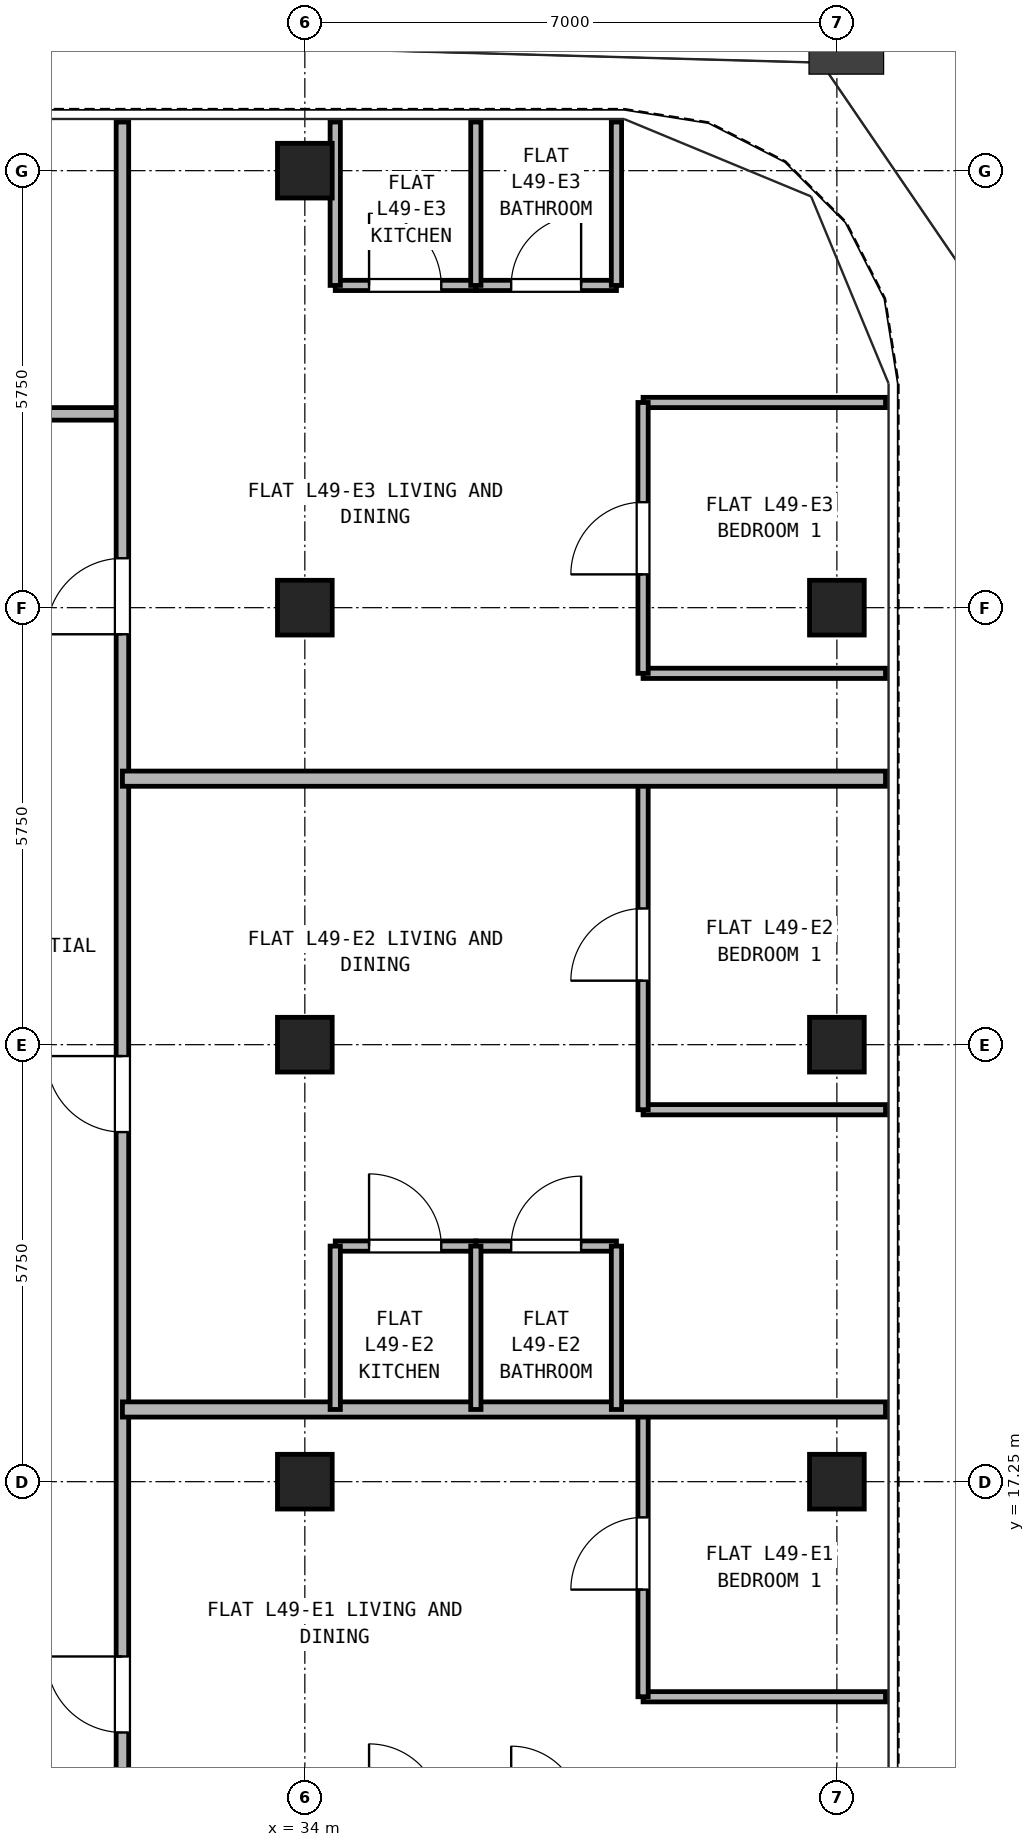
"""IFC4 building model, lengths in metres.
Left out: names, types, materials, properties, quantities, classifications, styles, units other than length and angle.
Written with IfcOpenShell. Run it as: python <this file> out.ifc"""

import sys

from ifc_helpers import new_model, si_unit, direction, frame, frame_2d, origin, origin_2d, place, context, subcontext, project, spatial, rectangle, hollow_rectangle, extrude, source, transform, mapped, element, fill, save


model = new_model("IFC4")
c1 = context("Model", 3, precision=1e-05, world=origin(), true_north=direction((0.0, 1.0)))
c2 = subcontext(c1, "Body", "Model", "MODEL_VIEW")
j1 = project(units=[si_unit("LENGTHUNIT", "METRE"), si_unit("PLANEANGLEUNIT", "RADIAN")], contexts=[c1])
p1 = place(None, origin())
s1 = spatial("IfcSite", under=j1, at=p1, CompositionType="ELEMENT")
p2 = place(p1, origin())
s2 = spatial("IfcBuilding", under=s1, at=p2, CompositionType="ELEMENT")
p3 = place(p2, frame((0.0, 0.0, 175.3)))
s3 = spatial("IfcBuildingStorey", under=s2, at=p3, CompositionType="ELEMENT", Elevation=175.3)
m1 = source(origin(), c2, "Body", "SweptSolid", [
    extrude(hollow_rectangle(XDim=0.72, YDim=0.72, WallThickness=0.04, at=origin_2d()), origin(), (0.0, 0.0, 1.0), 2.95),
])
for number, where, z_axis, x_axis in (
    (1, (34.0, 34.5, 0.0), (0.0, 0.0, 1.0), (1.0, 0.0, 0.0)),
    (2, (41.0, 17.25, 0.0), (0.0, 0.0, 1.0), (1.0, 0.0, 0.0)),
    (3, (41.0, 23.0, 0.0), (0.0, 0.0, 1.0), (1.0, 0.0, 0.0)),
    (4, (41.0, 28.75, 0.0), (0.0, 0.0, 1.0), (1.0, 0.0, 0.0)),
    (5, (34.0, 17.25, 0.0), (0.0, 0.0, 1.0), (1.0, 0.0, 0.0)),
    (6, (34.0, 23.0, 0.0), (0.0, 0.0, 1.0), (1.0, 0.0, 0.0)),
    (7, (34.0, 28.75, 0.0), (0.0, 0.0, 1.0), (1.0, 0.0, 0.0)),
):
    element("IfcColumn", number, at=place(p3, frame(where, z_axis=z_axis, x_axis=x_axis)), inside=s3, PredefinedType="COLUMN", context=c2, shape_type="MappedRepresentation", body=[
        mapped(m1, transform((0.0, 0.0, 0.0), x_axis=(1.0, 0.0, 0.0), y_axis=(0.0, 1.0, 0.0), z_axis=(0.0, 0.0, 1.0), scale=1.0)),
    ])
p4 = place(p3, frame((15.4, 31.3, 0.0), z_axis=(0.0, 0.0, 1.0), x_axis=(1.0, 0.0, 0.0)))
e8 = element("IfcWall", 8, at=p4, inside=s3, PredefinedType="PARTITIONING", context=c2, shape_type="SweptSolid", body=[
    extrude(rectangle(XDim=16.2, YDim=0.165, at=frame_2d((8.1, 0.0))), origin(), (0.0, 0.0, 1.0), 2.95),
])
p5 = place(p4, frame((2.8, 0.0, 0.0)))
e9 = element("IfcOpeningElement", 9, at=p5, cuts=e8, PredefinedType="OPENING", context=c2, shape_type="SweptSolid", body=[
    extrude(rectangle(XDim=0.95, YDim=2.15, at=frame_2d((0.475, 1.075))), frame((0.0, 0.093, 0.0), z_axis=(0.0, -1.0, 0.0), x_axis=(1.0, 0.0, 0.0)), (0.0, 0.0, 1.0), 0.185),
])
p6 = place(p4, frame((8.15, 0.0, 0.0)))
e10 = element("IfcOpeningElement", 10, at=p6, cuts=e8, PredefinedType="OPENING", context=c2, shape_type="SweptSolid", body=[
    extrude(rectangle(XDim=0.95, YDim=2.15, at=frame_2d((0.475, 1.075))), frame((0.0, 0.093, 0.0), z_axis=(0.0, -1.0, 0.0), x_axis=(1.0, 0.0, 0.0)), (0.0, 0.0, 1.0), 0.185),
])
p7 = place(p4, frame((12.95, 0.0, 0.0)))
e11 = element("IfcOpeningElement", 11, at=p7, cuts=e8, PredefinedType="OPENING", context=c2, shape_type="SweptSolid", body=[
    extrude(rectangle(XDim=0.92, YDim=2.1, at=frame_2d((0.46, 1.05))), frame((0.0, 0.093, 0.0), z_axis=(0.0, -1.0, 0.0), x_axis=(1.0, 0.0, 0.0)), (0.0, 0.0, 1.0), 0.185),
])
p8 = place(p3, frame((31.6, 10.7, 0.0), z_axis=(0.0, 0.0, 1.0), x_axis=(0.0, 1.0, 0.0)))
e12 = element("IfcWall", 12, at=p8, inside=s3, PredefinedType="PARTITIONING", context=c2, shape_type="SweptSolid", body=[
    extrude(rectangle(XDim=24.44, YDim=0.165, at=frame_2d((12.22, 0.0))), origin(), (0.0, 0.0, 1.0), 2.95),
])
p9 = place(p8, frame((3.25, 0.0, 0.0)))
e13 = element("IfcOpeningElement", 13, at=p9, cuts=e12, PredefinedType="OPENING", context=c2, shape_type="SweptSolid", body=[
    extrude(rectangle(XDim=1.0, YDim=2.15, at=frame_2d((0.5, 1.075))), frame((0.0, 0.093, 0.0), z_axis=(0.0, -1.0, 0.0), x_axis=(1.0, 0.0, 0.0)), (0.0, 0.0, 1.0), 0.185),
])
p10 = place(p8, frame((11.15, 0.0, 0.0)))
e14 = element("IfcOpeningElement", 14, at=p10, cuts=e12, PredefinedType="OPENING", context=c2, shape_type="SweptSolid", body=[
    extrude(rectangle(XDim=1.0, YDim=2.15, at=frame_2d((0.5, 1.075))), frame((0.0, 0.093, 0.0), z_axis=(0.0, -1.0, 0.0), x_axis=(1.0, 0.0, 0.0)), (0.0, 0.0, 1.0), 0.185),
])
p11 = place(p8, frame((17.7, 0.0, 0.0)))
e15 = element("IfcOpeningElement", 15, at=p11, cuts=e12, PredefinedType="OPENING", context=c2, shape_type="SweptSolid", body=[
    extrude(rectangle(XDim=1.0, YDim=2.15, at=frame_2d((0.5, 1.075))), frame((0.0, 0.093, 0.0), z_axis=(0.0, -1.0, 0.0), x_axis=(1.0, 0.0, 0.0)), (0.0, 0.0, 1.0), 0.185),
])
p12 = place(p3, frame((38.45, 14.42, 0.0), z_axis=(0.0, 0.0, 1.0), x_axis=(1.0, 0.0, 0.0)))
e16 = element("IfcWall", 16, at=p12, inside=s3, PredefinedType="PARTITIONING", context=c2, shape_type="SweptSolid", body=[
    extrude(rectangle(XDim=3.19, YDim=0.135, at=frame_2d((1.595, 0.0))), origin(), (0.0, 0.0, 1.0), 2.583),
])
p13 = place(p3, frame((38.45, 14.42, 0.0), z_axis=(0.0, 0.0, 1.0), x_axis=(0.0, 1.0, 0.0)))
e17 = element("IfcWall", 17, at=p13, inside=s3, PredefinedType="PARTITIONING", context=c2, shape_type="SweptSolid", body=[
    extrude(rectangle(XDim=3.78, YDim=0.135, at=frame_2d((1.89, 0.0))), origin(), (0.0, 0.0, 1.0), 2.95),
])
p14 = place(p13, frame((1.41, 0.0, 0.0)))
e18 = element("IfcOpeningElement", 18, at=p14, cuts=e17, PredefinedType="OPENING", context=c2, shape_type="SweptSolid", body=[
    extrude(rectangle(XDim=0.95, YDim=2.15, at=frame_2d((0.475, 1.075))), frame((0.0, 0.077, 0.0), z_axis=(0.0, -1.0, 0.0), x_axis=(1.0, 0.0, 0.0)), (0.0, 0.0, 1.0), 0.155),
])
p15 = place(p3, frame((31.6, 18.2, 0.0), z_axis=(0.0, 0.0, 1.0), x_axis=(1.0, 0.0, 0.0)))
e19 = element("IfcWall", 19, at=p15, inside=s3, PredefinedType="PARTITIONING", context=c2, shape_type="SweptSolid", body=[
    extrude(rectangle(XDim=10.04, YDim=0.2, at=frame_2d((5.02, 0.0))), origin(), (0.0, 0.0, 1.0), 2.95),
])
p16 = place(p3, frame((34.4, 20.35, 0.0), z_axis=(0.0, 0.0, 1.0), x_axis=(1.0, 0.0, 0.0)))
e20 = element("IfcWall", 20, at=p16, inside=s3, PredefinedType="PARTITIONING", context=c2, shape_type="SweptSolid", body=[
    extrude(rectangle(XDim=1.85, YDim=0.135, at=frame_2d((0.925, 0.0))), origin(), (0.0, 0.0, 1.0), 2.583),
])
p17 = place(p16, frame((0.445, 0.0, 0.0)))
e21 = element("IfcOpeningElement", 21, at=p17, cuts=e20, PredefinedType="OPENING", context=c2, shape_type="SweptSolid", body=[
    extrude(rectangle(XDim=0.95, YDim=2.15, at=frame_2d((0.475, 1.075))), frame((0.0, 0.077, 0.0), z_axis=(0.0, -1.0, 0.0), x_axis=(1.0, 0.0, 0.0)), (0.0, 0.0, 1.0), 0.155),
])
p18 = place(p3, frame((36.25, 20.35, 0.0), z_axis=(0.0, 0.0, 1.0), x_axis=(1.0, 0.0, 0.0)))
e22 = element("IfcWall", 22, at=p18, inside=s3, PredefinedType="PARTITIONING", context=c2, shape_type="SweptSolid", body=[
    extrude(rectangle(XDim=1.85, YDim=0.135, at=frame_2d((0.925, 0.0))), origin(), (0.0, 0.0, 1.0), 2.583),
])
p19 = place(p18, frame((0.465, 0.0, 0.0)))
e23 = element("IfcOpeningElement", 23, at=p19, cuts=e22, PredefinedType="OPENING", context=c2, shape_type="SweptSolid", body=[
    extrude(rectangle(XDim=0.92, YDim=2.1, at=frame_2d((0.46, 1.05))), frame((0.0, 0.077, 0.0), z_axis=(0.0, -1.0, 0.0), x_axis=(1.0, 0.0, 0.0)), (0.0, 0.0, 1.0), 0.155),
])
for number, where, z_axis, x_axis in (
    (24, (34.4, 18.2, 0.0), (0.0, 0.0, 1.0), (0.0, 1.0, 0.0)),
    (25, (36.25, 18.2, 0.0), (0.0, 0.0, 1.0), (0.0, 1.0, 0.0)),
    (26, (38.1, 18.2, 0.0), (0.0, 0.0, 1.0), (0.0, 1.0, 0.0)),
):
    element("IfcWall", number, at=place(p3, frame(where, z_axis=z_axis, x_axis=x_axis)), inside=s3, PredefinedType="PARTITIONING", context=c2, shape_type="SweptSolid", body=[
        extrude(rectangle(XDim=2.15, YDim=0.135, at=frame_2d((1.075, 0.0))), origin(), (0.0, 0.0, 1.0), 2.95),
    ])
p20 = place(p3, frame((38.45, 22.144, 0.0), z_axis=(0.0, 0.0, 1.0), x_axis=(1.0, 0.0, 0.0)))
e27 = element("IfcWall", 27, at=p20, inside=s3, PredefinedType="PARTITIONING", context=c2, shape_type="SweptSolid", body=[
    extrude(rectangle(XDim=3.19, YDim=0.135, at=frame_2d((1.595, 0.0))), origin(), (0.0, 0.0, 1.0), 2.95),
])
p21 = place(p3, frame((38.45, 22.144, 0.0), z_axis=(0.0, 0.0, 1.0), x_axis=(0.0, 1.0, 0.0)))
e28 = element("IfcWall", 28, at=p21, inside=s3, PredefinedType="PARTITIONING", context=c2, shape_type="SweptSolid", body=[
    extrude(rectangle(XDim=4.356, YDim=0.135, at=frame_2d((2.178, 0.0))), origin(), (0.0, 0.0, 1.0), 2.95),
])
p22 = place(p21, frame((1.698, 0.0, 0.0)))
e29 = element("IfcOpeningElement", 29, at=p22, cuts=e28, PredefinedType="OPENING", context=c2, shape_type="SweptSolid", body=[
    extrude(rectangle(XDim=0.95, YDim=2.15, at=frame_2d((0.475, 1.075))), frame((0.0, 0.077, 0.0), z_axis=(0.0, -1.0, 0.0), x_axis=(1.0, 0.0, 0.0)), (0.0, 0.0, 1.0), 0.155),
])
p23 = place(p3, frame((31.6, 26.5, 0.0), z_axis=(0.0, 0.0, 1.0), x_axis=(1.0, 0.0, 0.0)))
e30 = element("IfcWall", 30, at=p23, inside=s3, PredefinedType="PARTITIONING", context=c2, shape_type="SweptSolid", body=[
    extrude(rectangle(XDim=10.04, YDim=0.2, at=frame_2d((5.02, 0.0))), origin(), (0.0, 0.0, 1.0), 2.95),
])
p24 = place(p3, frame((34.4, 32.99, 0.0), z_axis=(0.0, 0.0, 1.0), x_axis=(1.0, 0.0, 0.0)))
e31 = element("IfcWall", 31, at=p24, inside=s3, PredefinedType="PARTITIONING", context=c2, shape_type="SweptSolid", body=[
    extrude(rectangle(XDim=1.85, YDim=0.135, at=frame_2d((0.925, 0.0))), origin(), (0.0, 0.0, 1.0), 2.95),
])
p25 = place(p24, frame((0.445, 0.0, 0.0)))
e32 = element("IfcOpeningElement", 32, at=p25, cuts=e31, PredefinedType="OPENING", context=c2, shape_type="SweptSolid", body=[
    extrude(rectangle(XDim=0.95, YDim=2.15, at=frame_2d((0.475, 1.075))), frame((0.0, 0.077, 0.0), z_axis=(0.0, -1.0, 0.0), x_axis=(1.0, 0.0, 0.0)), (0.0, 0.0, 1.0), 0.155),
])
p26 = place(p3, frame((36.25, 32.99, 0.0), z_axis=(0.0, 0.0, 1.0), x_axis=(1.0, 0.0, 0.0)))
e33 = element("IfcWall", 33, at=p26, inside=s3, PredefinedType="PARTITIONING", context=c2, shape_type="SweptSolid", body=[
    extrude(rectangle(XDim=1.85, YDim=0.135, at=frame_2d((0.925, 0.0))), origin(), (0.0, 0.0, 1.0), 2.95),
])
p27 = place(p26, frame((0.465, 0.0, 0.0)))
e34 = element("IfcOpeningElement", 34, at=p27, cuts=e33, PredefinedType="OPENING", context=c2, shape_type="SweptSolid", body=[
    extrude(rectangle(XDim=0.92, YDim=2.1, at=frame_2d((0.46, 1.05))), frame((0.0, 0.077, 0.0), z_axis=(0.0, -1.0, 0.0), x_axis=(1.0, 0.0, 0.0)), (0.0, 0.0, 1.0), 0.155),
])
for number, where, z_axis, x_axis in (
    (35, (34.4, 32.99, 0.0), (0.0, 0.0, 1.0), (0.0, 1.0, 0.0)),
    (36, (36.25, 32.99, 0.0), (0.0, 0.0, 1.0), (0.0, 1.0, 0.0)),
    (37, (38.1, 32.99, 0.0), (0.0, 0.0, 1.0), (0.0, 1.0, 0.0)),
):
    element("IfcWall", number, at=place(p3, frame(where, z_axis=z_axis, x_axis=x_axis)), inside=s3, PredefinedType="PARTITIONING", context=c2, shape_type="SweptSolid", body=[
        extrude(rectangle(XDim=2.15, YDim=0.135, at=frame_2d((1.075, 0.0))), origin(), (0.0, 0.0, 1.0), 2.95),
    ])
for number, where, z_axis, x_axis in (
    (38, (38.45, 27.886, 0.0), (0.0, 0.0, 1.0), (1.0, 0.0, 0.0)),
    (39, (38.45, 31.45, 0.0), (0.0, 0.0, 1.0), (1.0, 0.0, 0.0)),
):
    element("IfcWall", number, at=place(p3, frame(where, z_axis=z_axis, x_axis=x_axis)), inside=s3, PredefinedType="PARTITIONING", context=c2, shape_type="SweptSolid", body=[
        extrude(rectangle(XDim=3.19, YDim=0.135, at=frame_2d((1.595, 0.0))), origin(), (0.0, 0.0, 1.0), 2.95),
    ])
p28 = place(p3, frame((38.45, 27.886, 0.0), z_axis=(0.0, 0.0, 1.0), x_axis=(0.0, 1.0, 0.0)))
e40 = element("IfcWall", 40, at=p28, inside=s3, PredefinedType="PARTITIONING", context=c2, shape_type="SweptSolid", body=[
    extrude(rectangle(XDim=3.564, YDim=0.135, at=frame_2d((1.782, 0.0))), origin(), (0.0, 0.0, 1.0), 2.95),
])
p29 = place(p28, frame((1.302, 0.0, 0.0)))
e41 = element("IfcOpeningElement", 41, at=p29, cuts=e40, PredefinedType="OPENING", context=c2, shape_type="SweptSolid", body=[
    extrude(rectangle(XDim=0.95, YDim=2.15, at=frame_2d((0.475, 1.075))), frame((0.0, 0.077, 0.0), z_axis=(0.0, -1.0, 0.0), x_axis=(1.0, 0.0, 0.0)), (0.0, 0.0, 1.0), 0.155),
])
p30 = place(p14, frame((0.95, 0.0, 0.0), z_axis=(0.0, 0.0, 1.0), x_axis=(-1.0, 0.0, 0.0)))
e42 = element("IfcDoor", 42, at=p30, inside=s3, OperationType="SINGLE_SWING_LEFT", PredefinedType="DOOR", context=c2, shape_type="SweptSolid", body=[
    extrude(rectangle(XDim=0.95, YDim=2.15, at=frame_2d((0.475, 1.075))), frame((0.0, 0.025, 0.0), z_axis=(0.0, -1.0, 0.0), x_axis=(1.0, 0.0, 0.0)), (0.0, 0.0, 1.0), 0.05),
])
fill(e18, e42)
p31 = place(p9, frame((1.0, 0.0, 0.0), z_axis=(0.0, 0.0, 1.0), x_axis=(-1.0, 0.0, 0.0)))
e43 = element("IfcDoor", 43, at=p31, inside=s3, OperationType="SINGLE_SWING_RIGHT", PredefinedType="DOOR", context=c2, shape_type="SweptSolid", body=[
    extrude(rectangle(XDim=1.0, YDim=2.15, at=frame_2d((0.5, 1.075))), frame((0.0, 0.025, 0.0), z_axis=(0.0, -1.0, 0.0), x_axis=(1.0, 0.0, 0.0)), (0.0, 0.0, 1.0), 0.05),
])
fill(e13, e43)
p32 = place(p17, origin())
e44 = element("IfcDoor", 44, at=p32, inside=s3, OperationType="SINGLE_SWING_LEFT", PredefinedType="DOOR", context=c2, shape_type="SweptSolid", body=[
    extrude(rectangle(XDim=0.95, YDim=2.15, at=frame_2d((0.475, 1.075))), frame((0.0, 0.025, 0.0), z_axis=(0.0, -1.0, 0.0), x_axis=(1.0, 0.0, 0.0)), (0.0, 0.0, 1.0), 0.05),
])
fill(e21, e44)
p33 = place(p19, origin())
e45 = element("IfcDoor", 45, at=p33, inside=s3, OperationType="SINGLE_SWING_RIGHT", PredefinedType="DOOR", context=c2, shape_type="SweptSolid", body=[
    extrude(rectangle(XDim=0.92, YDim=2.1, at=frame_2d((0.46, 1.05))), frame((0.0, 0.025, 0.0), z_axis=(0.0, -1.0, 0.0), x_axis=(1.0, 0.0, 0.0)), (0.0, 0.0, 1.0), 0.05),
])
fill(e23, e45)
p34 = place(p22, frame((0.95, 0.0, 0.0), z_axis=(0.0, 0.0, 1.0), x_axis=(-1.0, 0.0, 0.0)))
e46 = element("IfcDoor", 46, at=p34, inside=s3, OperationType="SINGLE_SWING_LEFT", PredefinedType="DOOR", context=c2, shape_type="SweptSolid", body=[
    extrude(rectangle(XDim=0.95, YDim=2.15, at=frame_2d((0.475, 1.075))), frame((0.0, 0.025, 0.0), z_axis=(0.0, -1.0, 0.0), x_axis=(1.0, 0.0, 0.0)), (0.0, 0.0, 1.0), 0.05),
])
fill(e29, e46)
p35 = place(p10, frame((1.0, 0.0, 0.0), z_axis=(0.0, 0.0, 1.0), x_axis=(-1.0, 0.0, 0.0)))
e47 = element("IfcDoor", 47, at=p35, inside=s3, OperationType="SINGLE_SWING_RIGHT", PredefinedType="DOOR", context=c2, shape_type="SweptSolid", body=[
    extrude(rectangle(XDim=1.0, YDim=2.15, at=frame_2d((0.5, 1.075))), frame((0.0, 0.025, 0.0), z_axis=(0.0, -1.0, 0.0), x_axis=(1.0, 0.0, 0.0)), (0.0, 0.0, 1.0), 0.05),
])
fill(e14, e47)
p36 = place(p25, frame((0.95, 0.0, 0.0), z_axis=(0.0, 0.0, 1.0), x_axis=(-1.0, 0.0, 0.0)))
e48 = element("IfcDoor", 48, at=p36, inside=s3, OperationType="SINGLE_SWING_LEFT", PredefinedType="DOOR", context=c2, shape_type="SweptSolid", body=[
    extrude(rectangle(XDim=0.95, YDim=2.15, at=frame_2d((0.475, 1.075))), frame((0.0, 0.025, 0.0), z_axis=(0.0, -1.0, 0.0), x_axis=(1.0, 0.0, 0.0)), (0.0, 0.0, 1.0), 0.05),
])
fill(e32, e48)
p37 = place(p27, frame((0.92, 0.0, 0.0), z_axis=(0.0, 0.0, 1.0), x_axis=(-1.0, 0.0, 0.0)))
e49 = element("IfcDoor", 49, at=p37, inside=s3, OperationType="SINGLE_SWING_RIGHT", PredefinedType="DOOR", context=c2, shape_type="SweptSolid", body=[
    extrude(rectangle(XDim=0.92, YDim=2.1, at=frame_2d((0.46, 1.05))), frame((0.0, 0.025, 0.0), z_axis=(0.0, -1.0, 0.0), x_axis=(1.0, 0.0, 0.0)), (0.0, 0.0, 1.0), 0.05),
])
fill(e34, e49)
p38 = place(p29, frame((0.95, 0.0, 0.0), z_axis=(0.0, 0.0, 1.0), x_axis=(-1.0, 0.0, 0.0)))
e50 = element("IfcDoor", 50, at=p38, inside=s3, OperationType="SINGLE_SWING_LEFT", PredefinedType="DOOR", context=c2, shape_type="SweptSolid", body=[
    extrude(rectangle(XDim=0.95, YDim=2.15, at=frame_2d((0.475, 1.075))), frame((0.0, 0.025, 0.0), z_axis=(0.0, -1.0, 0.0), x_axis=(1.0, 0.0, 0.0)), (0.0, 0.0, 1.0), 0.05),
])
fill(e41, e50)
p39 = place(p11, frame((1.0, 0.0, 0.0), z_axis=(0.0, 0.0, 1.0), x_axis=(-1.0, 0.0, 0.0)))
e51 = element("IfcDoor", 51, at=p39, inside=s3, OperationType="SINGLE_SWING_LEFT", PredefinedType="DOOR", context=c2, shape_type="SweptSolid", body=[
    extrude(rectangle(XDim=1.0, YDim=2.15, at=frame_2d((0.5, 1.075))), frame((0.0, 0.025, 0.0), z_axis=(0.0, -1.0, 0.0), x_axis=(1.0, 0.0, 0.0)), (0.0, 0.0, 1.0), 0.05),
])
fill(e15, e51)
save(model, sys.argv[1])
